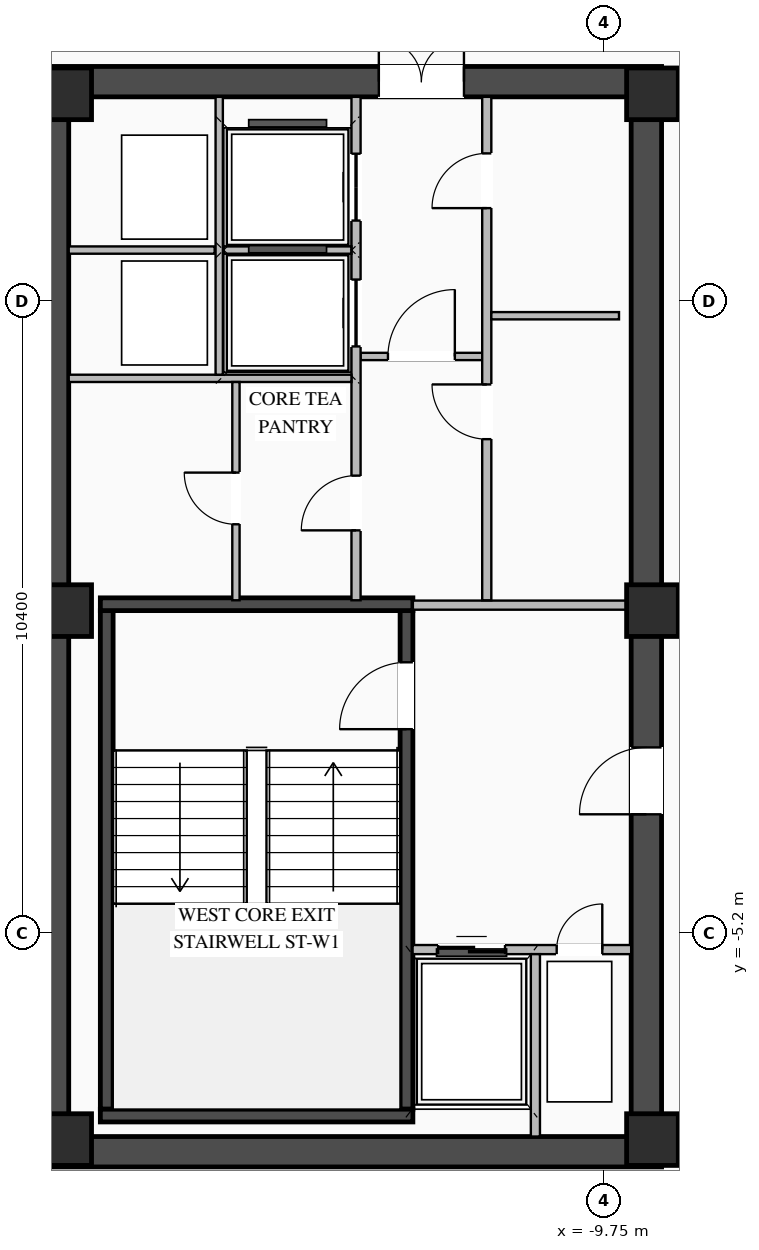
"""IFC4 building model, lengths in metres.
Left out: names, types, materials, properties, quantities, classifications, styles, units other than length and angle.
Written with IfcOpenShell. Run it as: python <this file> out.ifc"""

import sys

from ifc_helpers import new_model, si_unit, direction, frame, frame_2d, origin, origin_2d, place, context, subcontext, project, spatial, rectangle, extrude, element, fill, save


model = new_model("IFC4")
c1 = context("Model", 3, precision=1e-05, world=origin(), true_north=direction((0.0, 1.0)))
c2 = subcontext(c1, "Body", "Model", "MODEL_VIEW")
j1 = project(units=[si_unit("LENGTHUNIT", "METRE"), si_unit("PLANEANGLEUNIT", "RADIAN")], contexts=[c1])
p1 = place(None, origin())
s1 = spatial("IfcSite", under=j1, at=p1, CompositionType="ELEMENT")
p2 = place(p1, origin())
s2 = spatial("IfcBuilding", under=s1, at=p2, CompositionType="ELEMENT")
p3 = place(p2, frame((0.0, 0.0, 262.05)))
s3 = spatial("IfcBuildingStorey", under=s2, at=p3, CompositionType="ELEMENT", Elevation=262.05)
p4 = place(p3, frame((-19.05, -8.8, 0.0), z_axis=(0.0, 0.0, 1.0), x_axis=(1.0, 0.0, 0.0)))
e1 = element("IfcWall", 1, at=p4, inside=s3, PredefinedType="SHEAR", context=c2, shape_type="SweptSolid", body=[
    extrude(rectangle(XDim=10.25, YDim=0.5, at=frame_2d((5.125, 0.0))), origin(), (0.0, 0.0, 1.0), 3.27),
])
p5 = place(p3, frame((-19.05, 8.8, 0.0), z_axis=(0.0, 0.0, 1.0), x_axis=(1.0, 0.0, 0.0)))
e2 = element("IfcWall", 2, at=p5, inside=s3, PredefinedType="SHEAR", context=c2, shape_type="SweptSolid", body=[
    extrude(rectangle(XDim=10.25, YDim=0.5, at=frame_2d((5.125, 0.0))), origin(), (0.0, 0.0, 1.0), 3.27),
])
p6 = place(p5, frame((5.6, 0.0, 0.0)))
e3 = element("IfcOpeningElement", 3, at=p6, cuts=e2, PredefinedType="OPENING", context=c2, shape_type="SweptSolid", body=[
    extrude(rectangle(XDim=1.4, YDim=2.05, at=frame_2d((0.7, 1.025))), frame((0.0, 0.26, 0.0), z_axis=(0.0, -1.0, 0.0), x_axis=(1.0, 0.0, 0.0)), (0.0, 0.0, 1.0), 0.52),
])
p7 = place(p3, frame((-18.8, -8.55, 0.0), z_axis=(0.0, 0.0, 1.0), x_axis=(0.0, 1.0, 0.0)))
e4 = element("IfcWall", 4, at=p7, inside=s3, PredefinedType="SHEAR", context=c2, shape_type="SweptSolid", body=[
    extrude(rectangle(XDim=17.1, YDim=0.5, at=frame_2d((8.55, 0.0))), origin(), (0.0, 0.0, 1.0), 3.27),
])
p8 = place(p3, frame((-9.05, -8.55, 0.0), z_axis=(0.0, 0.0, 1.0), x_axis=(0.0, 1.0, 0.0)))
e5 = element("IfcWall", 5, at=p8, inside=s3, PredefinedType="SHEAR", context=c2, shape_type="SweptSolid", body=[
    extrude(rectangle(XDim=17.1, YDim=0.5, at=frame_2d((8.55, 0.0))), origin(), (0.0, 0.0, 1.0), 3.27),
])
p9 = place(p8, frame((5.3, 0.0, 0.0)))
e6 = element("IfcOpeningElement", 6, at=p9, cuts=e5, PredefinedType="OPENING", context=c2, shape_type="SweptSolid", body=[
    extrude(rectangle(XDim=1.1, YDim=2.08, at=frame_2d((0.55, 1.04))), frame((0.0, 0.26, 0.0), z_axis=(0.0, -1.0, 0.0), x_axis=(1.0, 0.0, 0.0)), (0.0, 0.0, 1.0), 0.52),
])
p10 = place(p3, frame((-12.995, -8.1, 0.0), z_axis=(0.0, 0.0, 1.0), x_axis=(0.0, 1.0, 0.0)))
e7 = element("IfcWall", 7, at=p10, inside=s3, PredefinedType="SHEAR", context=c2, shape_type="SweptSolid", body=[
    extrude(rectangle(XDim=8.2, YDim=0.21, at=frame_2d((4.1, 0.0))), origin(), (0.0, 0.0, 1.0), 3.27),
])
p11 = place(p10, frame((6.25, 0.0, 0.0)))
e8 = element("IfcOpeningElement", 8, at=p11, cuts=e7, PredefinedType="OPENING", context=c2, shape_type="SweptSolid", body=[
    extrude(rectangle(XDim=1.1, YDim=2.15, at=frame_2d((0.55, 1.075))), frame((0.0, 0.115, 0.0), z_axis=(0.0, -1.0, 0.0), x_axis=(1.0, 0.0, 0.0)), (0.0, 0.0, 1.0), 0.23),
])
p12 = place(p3, frame((-17.925, -8.1, 0.0), z_axis=(0.0, 0.0, 1.0), x_axis=(0.0, 1.0, 0.0)))
e9 = element("IfcWall", 9, at=p12, inside=s3, PredefinedType="SHEAR", context=c2, shape_type="SweptSolid", body=[
    extrude(rectangle(XDim=8.2, YDim=0.21, at=frame_2d((4.1, 0.0))), origin(), (0.0, 0.0, 1.0), 3.27),
])
for number, where, z_axis, x_axis in (
    (10, (-18.03, -8.205, 0.0), (0.0, 0.0, 1.0), (1.0, 0.0, 0.0)),
    (11, (-12.89, 0.205, 0.0), (0.0, 0.0, 1.0), (-1.0, 0.0, 0.0)),
):
    element("IfcWall", number, at=place(p3, frame(where, z_axis=z_axis, x_axis=x_axis)), inside=s3, PredefinedType="SHEAR", context=c2, shape_type="SweptSolid", body=[
        extrude(rectangle(XDim=5.14, YDim=0.21, at=frame_2d((2.57, 0.0))), origin(), (0.0, 0.0, 1.0), 3.27),
    ])
for number, where, z_axis, x_axis in (
    (12, (-8.95, -8.6, 0.0), (0.0, 0.0, 1.0), (1.0, 0.0, 0.0)),
    (13, (-8.95, 0.1, 0.0), (0.0, 0.0, 1.0), (1.0, 0.0, 0.0)),
    (14, (-8.95, 8.6, 0.0), (0.0, 0.0, 1.0), (1.0, 0.0, 0.0)),
    (15, (-18.6, -8.6, 0.0), (0.0, 0.0, 1.0), (1.0, 0.0, 0.0)),
    (16, (-18.6, 0.1, 0.0), (0.0, 0.0, 1.0), (1.0, 0.0, 0.0)),
    (17, (-18.6, 8.6, 0.0), (0.0, 0.0, 1.0), (1.0, 0.0, 0.0)),
):
    element("IfcColumn", number, at=place(p3, frame(where, z_axis=z_axis, x_axis=x_axis)), inside=s3, PredefinedType="COLUMN", context=c2, shape_type="SweptSolid", body=[
        extrude(rectangle(XDim=0.85, YDim=0.85, at=origin_2d()), origin(), (0.0, 0.0, 1.0), 3.45),
    ])
p13 = place(p3, frame((-12.895, -5.475, 0.0), z_axis=(0.0, 0.0, 1.0), x_axis=(1.0, 0.0, 0.0)))
e18 = element("IfcWall", 18, at=p13, inside=s3, PredefinedType="STANDARD", context=c2, shape_type="SweptSolid", body=[
    extrude(rectangle(XDim=3.595, YDim=0.15, at=frame_2d((1.797, 0.0))), origin(), (0.0, 0.0, 1.0), 3.25),
])
p14 = place(p13, frame((0.42, 0.0, 0.0)))
e19 = element("IfcOpeningElement", 19, at=p14, cuts=e18, PredefinedType="OPENING", context=c2, shape_type="SweptSolid", body=[
    extrude(rectangle(XDim=1.1, YDim=2.15, at=frame_2d((0.55, 1.075))), frame((0.0, 0.085, 0.0), z_axis=(0.0, -1.0, 0.0), x_axis=(1.0, 0.0, 0.0)), (0.0, 0.0, 1.0), 0.17),
])
p15 = place(p13, frame((2.37, 0.0, 0.0)))
e20 = element("IfcOpeningElement", 20, at=p15, cuts=e18, PredefinedType="OPENING", context=c2, shape_type="SweptSolid", body=[
    extrude(rectangle(XDim=0.75, YDim=2.05, at=frame_2d((0.375, 1.025))), frame((0.0, 0.085, 0.0), z_axis=(0.0, -1.0, 0.0), x_axis=(1.0, 0.0, 0.0)), (0.0, 0.0, 1.0), 0.17),
])
p16 = place(p3, frame((-10.875, -8.55, 0.0), z_axis=(0.0, 0.0, 1.0), x_axis=(0.0, 1.0, 0.0)))
e21 = element("IfcWall", 21, at=p16, inside=s3, PredefinedType="STANDARD", context=c2, shape_type="SweptSolid", body=[
    extrude(rectangle(XDim=3.0, YDim=0.15, at=frame_2d((1.5, 0.0))), origin(), (0.0, 0.0, 1.0), 3.25),
])
p17 = place(p3, frame((-12.89, 0.19, 0.0), z_axis=(0.0, 0.0, 1.0), x_axis=(1.0, 0.0, 0.0)))
e22 = element("IfcWall", 22, at=p17, inside=s3, PredefinedType="STANDARD", context=c2, shape_type="SweptSolid", body=[
    extrude(rectangle(XDim=3.59, YDim=0.15, at=frame_2d((1.795, 0.0))), origin(), (0.0, 0.0, 1.0), 2.645),
])
p18 = place(p3, frame((-13.75, 4.28, 0.0), z_axis=(0.0, 0.0, 1.0), x_axis=(1.0, 0.0, 0.0)))
e23 = element("IfcWall", 23, at=p18, inside=s3, PredefinedType="STANDARD", context=c2, shape_type="SweptSolid", body=[
    extrude(rectangle(XDim=2.0, YDim=0.12, at=frame_2d((1.0, 0.0))), origin(), (0.0, 0.0, 1.0), 3.25),
])
p19 = place(p18, frame((0.45, 0.0, 0.0)))
e24 = element("IfcOpeningElement", 24, at=p19, cuts=e23, PredefinedType="OPENING", context=c2, shape_type="SweptSolid", body=[
    extrude(rectangle(XDim=1.1, YDim=2.1, at=frame_2d((0.55, 1.05))), frame((0.0, 0.07, 0.0), z_axis=(0.0, -1.0, 0.0), x_axis=(1.0, 0.0, 0.0)), (0.0, 0.0, 1.0), 0.14),
])
p20 = place(p3, frame((-11.675, 0.27, 0.0), z_axis=(0.0, 0.0, 1.0), x_axis=(0.0, 1.0, 0.0)))
e25 = element("IfcWall", 25, at=p20, inside=s3, PredefinedType="STANDARD", context=c2, shape_type="SweptSolid", body=[
    extrude(rectangle(XDim=8.28, YDim=0.15, at=frame_2d((4.14, 0.0))), origin(), (0.0, 0.0, 1.0), 3.25),
])
p21 = place(p20, frame((2.65, 0.0, 0.0)))
e26 = element("IfcOpeningElement", 26, at=p21, cuts=e25, PredefinedType="OPENING", context=c2, shape_type="SweptSolid", body=[
    extrude(rectangle(XDim=0.9, YDim=2.05, at=frame_2d((0.45, 1.025))), frame((0.0, 0.085, 0.0), z_axis=(0.0, -1.0, 0.0), x_axis=(1.0, 0.0, 0.0)), (0.0, 0.0, 1.0), 0.17),
])
p22 = place(p20, frame((6.45, 0.0, 0.0)))
e27 = element("IfcOpeningElement", 27, at=p22, cuts=e25, PredefinedType="OPENING", context=c2, shape_type="SweptSolid", body=[
    extrude(rectangle(XDim=0.9, YDim=2.05, at=frame_2d((0.45, 1.025))), frame((0.0, 0.085, 0.0), z_axis=(0.0, -1.0, 0.0), x_axis=(1.0, 0.0, 0.0)), (0.0, 0.0, 1.0), 0.17),
])
p23 = place(p3, frame((-11.6, 4.95, 0.0), z_axis=(0.0, 0.0, 1.0), x_axis=(1.0, 0.0, 0.0)))
e28 = element("IfcWall", 28, at=p23, inside=s3, PredefinedType="STANDARD", context=c2, shape_type="SweptSolid", body=[
    extrude(rectangle(XDim=2.1, YDim=0.12, at=frame_2d((1.05, 0.0))), origin(), (0.0, 0.0, 1.0), 3.25),
])
p24 = place(p3, frame((-13.825, 0.27, 0.0), z_axis=(0.0, 0.0, 1.0), x_axis=(0.0, 1.0, 0.0)))
e29 = element("IfcWall", 29, at=p24, inside=s3, PredefinedType="STANDARD", context=c2, shape_type="SweptSolid", body=[
    extrude(rectangle(XDim=8.28, YDim=0.15, at=frame_2d((4.14, 0.0))), origin(), (0.0, 0.0, 1.0), 3.25),
])
p25 = place(p24, frame((4.175, 0.0, 0.0)))
e30 = element("IfcOpeningElement", 30, at=p25, cuts=e29, PredefinedType="OPENING", context=c2, shape_type="SweptSolid", body=[
    extrude(rectangle(XDim=1.1, YDim=2.1, at=frame_2d((0.55, 1.05))), frame((0.0, 0.085, 0.0), z_axis=(0.0, -1.0, 0.0), x_axis=(1.0, 0.0, 0.0)), (0.0, 0.0, 1.0), 0.17),
])
p26 = place(p24, frame((6.245, 0.0, 0.0)))
e31 = element("IfcOpeningElement", 31, at=p26, cuts=e29, PredefinedType="OPENING", context=c2, shape_type="SweptSolid", body=[
    extrude(rectangle(XDim=1.1, YDim=2.1, at=frame_2d((0.55, 1.05))), frame((0.0, 0.085, 0.0), z_axis=(0.0, -1.0, 0.0), x_axis=(1.0, 0.0, 0.0)), (0.0, 0.0, 1.0), 0.17),
])
p27 = place(p24, frame((1.15, 0.0, 0.0)))
e32 = element("IfcOpeningElement", 32, at=p27, cuts=e29, PredefinedType="OPENING", context=c2, shape_type="SweptSolid", body=[
    extrude(rectangle(XDim=0.9, YDim=2.05, at=frame_2d((0.45, 1.025))), frame((0.0, 0.085, 0.0), z_axis=(0.0, -1.0, 0.0), x_axis=(1.0, 0.0, 0.0)), (0.0, 0.0, 1.0), 0.17),
])
p28 = place(p3, frame((-18.55, 3.92, 0.0), z_axis=(0.0, 0.0, 1.0), x_axis=(1.0, 0.0, 0.0)))
e33 = element("IfcWall", 33, at=p28, inside=s3, PredefinedType="STANDARD", context=c2, shape_type="SweptSolid", body=[
    extrude(rectangle(XDim=4.65, YDim=0.12, at=frame_2d((2.325, 0.0))), origin(), (0.0, 0.0, 1.0), 3.25),
])
p29 = place(p3, frame((-18.55, 6.03, 0.0), z_axis=(0.0, 0.0, 1.0), x_axis=(1.0, 0.0, 0.0)))
e34 = element("IfcWall", 34, at=p29, inside=s3, PredefinedType="STANDARD", context=c2, shape_type="SweptSolid", body=[
    extrude(rectangle(XDim=2.4, YDim=0.12, at=frame_2d((1.2, 0.0))), origin(), (0.0, 0.0, 1.0), 3.25),
])
p30 = place(p3, frame((-16.075, 3.98, 0.0), z_axis=(0.0, 0.0, 1.0), x_axis=(0.0, 1.0, 0.0)))
e35 = element("IfcWall", 35, at=p30, inside=s3, PredefinedType="STANDARD", context=c2, shape_type="SweptSolid", body=[
    extrude(rectangle(XDim=4.57, YDim=0.12, at=frame_2d((2.285, 0.0))), origin(), (0.0, 0.0, 1.0), 3.25),
])
p31 = place(p3, frame((-16.0, 6.03, 0.0), z_axis=(0.0, 0.0, 1.0), x_axis=(1.0, 0.0, 0.0)))
e36 = element("IfcWall", 36, at=p31, inside=s3, PredefinedType="STANDARD", context=c2, shape_type="SweptSolid", body=[
    extrude(rectangle(XDim=2.1, YDim=0.12, at=frame_2d((1.05, 0.0))), origin(), (0.0, 0.0, 1.0), 3.25),
])
p32 = place(p3, frame((-15.8, 0.27, 0.0), z_axis=(0.0, 0.0, 1.0), x_axis=(0.0, 1.0, 0.0)))
e37 = element("IfcWall", 37, at=p32, inside=s3, PredefinedType="STANDARD", context=c2, shape_type="SweptSolid", body=[
    extrude(rectangle(XDim=3.59, YDim=0.12, at=frame_2d((1.795, 0.0))), origin(), (0.0, 0.0, 1.0), 3.25),
])
p33 = place(p32, frame((1.25, 0.0, 0.0)))
e38 = element("IfcOpeningElement", 38, at=p33, cuts=e37, PredefinedType="OPENING", context=c2, shape_type="SweptSolid", body=[
    extrude(rectangle(XDim=0.85, YDim=2.05, at=frame_2d((0.425, 1.025))), frame((0.0, 0.07, 0.0), z_axis=(0.0, -1.0, 0.0), x_axis=(1.0, 0.0, 0.0)), (0.0, 0.0, 1.0), 0.14),
])
p34 = place(p11, origin())
e39 = element("IfcDoor", 39, at=p34, inside=s3, OperationType="SINGLE_SWING_LEFT", PredefinedType="DOOR", context=c2, shape_type="SweptSolid", body=[
    extrude(rectangle(XDim=1.1, YDim=2.15, at=frame_2d((0.55, 1.075))), frame((0.0, 0.025, 0.0), z_axis=(0.0, -1.0, 0.0), x_axis=(1.0, 0.0, 0.0)), (0.0, 0.0, 1.0), 0.05),
])
fill(e8, e39)
p35 = place(p14, origin())
e40 = element("IfcDoor", 40, at=p35, inside=s3, OperationType="DOUBLE_DOOR_SLIDING", PredefinedType="DOOR", context=c2, shape_type="SweptSolid", body=[
    extrude(rectangle(XDim=1.1, YDim=2.15, at=frame_2d((0.55, 1.075))), frame((0.0, 0.025, 0.0), z_axis=(0.0, -1.0, 0.0), x_axis=(1.0, 0.0, 0.0)), (0.0, 0.0, 1.0), 0.05),
])
fill(e19, e40)
p36 = place(p15, origin())
e41 = element("IfcDoor", 41, at=p36, inside=s3, OperationType="SINGLE_SWING_RIGHT", PredefinedType="DOOR", context=c2, shape_type="SweptSolid", body=[
    extrude(rectangle(XDim=0.75, YDim=2.05, at=frame_2d((0.375, 1.025))), frame((0.0, 0.025, 0.0), z_axis=(0.0, -1.0, 0.0), x_axis=(1.0, 0.0, 0.0)), (0.0, 0.0, 1.0), 0.05),
])
fill(e20, e41)
p37 = place(p9, origin())
e42 = element("IfcDoor", 42, at=p37, inside=s3, OperationType="SINGLE_SWING_LEFT", PredefinedType="DOOR", context=c2, shape_type="SweptSolid", body=[
    extrude(rectangle(XDim=1.1, YDim=2.08, at=frame_2d((0.55, 1.04))), frame((0.0, 0.205, 0.0), z_axis=(0.0, -1.0, 0.0), x_axis=(1.0, 0.0, 0.0)), (0.0, 0.0, 1.0), 0.05),
])
fill(e6, e42)
p38 = place(p19, origin())
e43 = element("IfcDoor", 43, at=p38, inside=s3, OperationType="SINGLE_SWING_RIGHT", PredefinedType="DOOR", context=c2, shape_type="SweptSolid", body=[
    extrude(rectangle(XDim=1.1, YDim=2.1, at=frame_2d((0.55, 1.05))), frame((0.0, 0.025, 0.0), z_axis=(0.0, -1.0, 0.0), x_axis=(1.0, 0.0, 0.0)), (0.0, 0.0, 1.0), 0.05),
])
fill(e24, e43)
p39 = place(p6, origin())
e44 = element("IfcDoor", 44, at=p39, inside=s3, OperationType="DOUBLE_DOOR_SINGLE_SWING", PredefinedType="DOOR", context=c2, shape_type="SweptSolid", body=[
    extrude(rectangle(XDim=1.4, YDim=2.05, at=frame_2d((0.7, 1.025))), frame((0.0, 0.195, 0.0), z_axis=(0.0, -1.0, 0.0), x_axis=(1.0, 0.0, 0.0)), (0.0, 0.0, 1.0), 0.05),
])
fill(e3, e44)
p40 = place(p21, origin())
e45 = element("IfcDoor", 45, at=p40, inside=s3, OperationType="SINGLE_SWING_RIGHT", PredefinedType="DOOR", context=c2, shape_type="SweptSolid", body=[
    extrude(rectangle(XDim=0.9, YDim=2.05, at=frame_2d((0.45, 1.025))), frame((0.0, 0.025, 0.0), z_axis=(0.0, -1.0, 0.0), x_axis=(1.0, 0.0, 0.0)), (0.0, 0.0, 1.0), 0.05),
])
fill(e26, e45)
p41 = place(p22, origin())
e46 = element("IfcDoor", 46, at=p41, inside=s3, OperationType="SINGLE_SWING_LEFT", PredefinedType="DOOR", context=c2, shape_type="SweptSolid", body=[
    extrude(rectangle(XDim=0.9, YDim=2.05, at=frame_2d((0.45, 1.025))), frame((0.0, 0.025, 0.0), z_axis=(0.0, -1.0, 0.0), x_axis=(1.0, 0.0, 0.0)), (0.0, 0.0, 1.0), 0.05),
])
fill(e27, e46)
p42 = place(p25, origin())
e47 = element("IfcDoor", 47, at=p42, inside=s3, OperationType="DOUBLE_DOOR_SLIDING", PredefinedType="DOOR", context=c2, shape_type="SweptSolid", body=[
    extrude(rectangle(XDim=1.1, YDim=2.1, at=frame_2d((0.55, 1.05))), frame((0.0, 0.025, 0.0), z_axis=(0.0, -1.0, 0.0), x_axis=(1.0, 0.0, 0.0)), (0.0, 0.0, 1.0), 0.05),
])
fill(e30, e47)
p43 = place(p26, origin())
e48 = element("IfcDoor", 48, at=p43, inside=s3, OperationType="DOUBLE_DOOR_SLIDING", PredefinedType="DOOR", context=c2, shape_type="SweptSolid", body=[
    extrude(rectangle(XDim=1.1, YDim=2.1, at=frame_2d((0.55, 1.05))), frame((0.0, 0.025, 0.0), z_axis=(0.0, -1.0, 0.0), x_axis=(1.0, 0.0, 0.0)), (0.0, 0.0, 1.0), 0.05),
])
fill(e31, e48)
p44 = place(p27, origin())
e49 = element("IfcDoor", 49, at=p44, inside=s3, OperationType="SINGLE_SWING_LEFT", PredefinedType="DOOR", context=c2, shape_type="SweptSolid", body=[
    extrude(rectangle(XDim=0.9, YDim=2.05, at=frame_2d((0.45, 1.025))), frame((0.0, 0.025, 0.0), z_axis=(0.0, -1.0, 0.0), x_axis=(1.0, 0.0, 0.0)), (0.0, 0.0, 1.0), 0.05),
])
fill(e32, e49)
p45 = place(p33, origin())
e50 = element("IfcDoor", 50, at=p45, inside=s3, OperationType="SINGLE_SWING_RIGHT", PredefinedType="DOOR", context=c2, shape_type="SweptSolid", body=[
    extrude(rectangle(XDim=0.85, YDim=2.05, at=frame_2d((0.425, 1.025))), frame((0.0, 0.025, 0.0), z_axis=(0.0, -1.0, 0.0), x_axis=(1.0, 0.0, 0.0)), (0.0, 0.0, 1.0), 0.05),
])
fill(e38, e50)
save(model, sys.argv[1])
